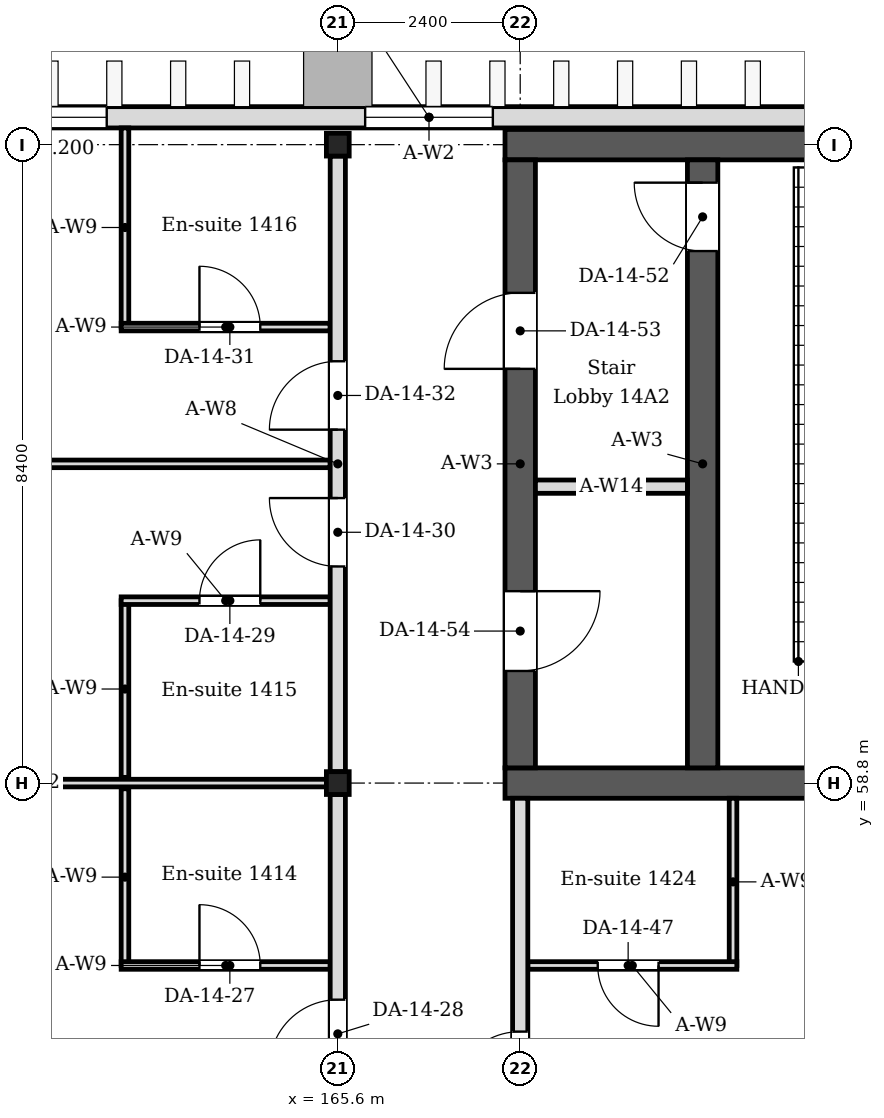
"""IFC4 building model, lengths in metres.
Left out: names, types, materials, properties, quantities, classifications, styles, units other than length and angle.
Written with IfcOpenShell. Run it as: python <this file> out.ifc"""

import sys

from ifc_helpers import new_model, si_unit, direction, frame, frame_2d, origin, origin_2d, place, context, subcontext, project, spatial, rectangle, i_section, extrude, element, fill, save


model = new_model("IFC4")
c1 = context("Model", 3, precision=1e-05, world=origin(), true_north=direction((0.0, 1.0)))
c2 = subcontext(c1, "Body", "Model", "MODEL_VIEW")
j1 = project(units=[si_unit("LENGTHUNIT", "METRE"), si_unit("PLANEANGLEUNIT", "RADIAN")], contexts=[c1])
p1 = place(None, origin())
s1 = spatial("IfcSite", under=j1, at=p1, CompositionType="ELEMENT")
p2 = place(p1, origin())
s2 = spatial("IfcBuilding", under=s1, at=p2, CompositionType="ELEMENT")
p3 = place(p2, frame((0.0, 0.0, 60.6)))
s3 = spatial("IfcBuildingStorey", under=s2, at=p3, CompositionType="ELEMENT", Elevation=60.6)
for number, where, z_axis, x_axis in (
    (1, (165.6, 58.8, 0.0), (0.0, 0.0, 1.0), (1.0, 0.0, 0.0)),
    (2, (165.6, 67.2, 0.0), (0.0, 0.0, 1.0), (1.0, 0.0, 0.0)),
):
    element("IfcColumn", number, at=place(p3, frame(where, z_axis=z_axis, x_axis=x_axis)), inside=s3, PredefinedType="COLUMN", context=c2, shape_type="SweptSolid", body=[
        extrude(i_section(OverallWidth=0.3, OverallDepth=0.3, WebThickness=0.01, FlangeThickness=0.015, FilletRadius=0.013, at=origin_2d()), origin(), (0.0, 0.0, 1.0), 4.2),
    ])
for number, where, z_axis, x_axis in (
    (3, (167.8, 58.8, 0.0), (0.0, 0.0, 1.0), (1.0, 0.0, 0.0)),
    (4, (167.8, 67.2, 0.0), (0.0, 0.0, 1.0), (1.0, 0.0, 0.0)),
):
    element("IfcWall", number, at=place(p3, frame(where, z_axis=z_axis, x_axis=x_axis)), inside=s3, PredefinedType="SOLIDWALL", context=c2, shape_type="SweptSolid", body=[
        extrude(rectangle(XDim=8.8, YDim=0.4, at=frame_2d((4.4, 0.0))), origin(), (0.0, 0.0, 1.0), 4.05),
    ])
p4 = place(p3, frame((168.0, 59.0, 0.0), z_axis=(0.0, 0.0, 1.0), x_axis=(0.0, 1.0, 0.0)))
e5 = element("IfcWall", 5, at=p4, inside=s3, PredefinedType="SOLIDWALL", context=c2, shape_type="SweptSolid", body=[
    extrude(rectangle(XDim=8.0, YDim=0.4, at=frame_2d((4.0, 0.0))), origin(), (0.0, 0.0, 1.0), 4.05),
])
p5 = place(p4, frame((5.25, 0.0, 0.0)))
e6 = element("IfcOpeningElement", 6, at=p5, cuts=e5, PredefinedType="OPENING", context=c2, shape_type="SweptSolid", body=[
    extrude(rectangle(XDim=1.0, YDim=2.1, at=frame_2d((0.5, 1.05))), frame((0.0, 0.21, 0.0), z_axis=(0.0, -1.0, 0.0), x_axis=(1.0, 0.0, 0.0)), (0.0, 0.0, 1.0), 0.42),
])
p6 = place(p4, frame((1.275, 0.0, 0.0)))
e7 = element("IfcOpeningElement", 7, at=p6, cuts=e5, PredefinedType="OPENING", context=c2, shape_type="SweptSolid", body=[
    extrude(rectangle(XDim=1.05, YDim=2.1, at=frame_2d((0.525, 1.05))), frame((0.0, 0.21, 0.0), z_axis=(0.0, -1.0, 0.0), x_axis=(1.0, 0.0, 0.0)), (0.0, 0.0, 1.0), 0.42),
])
p7 = place(p3, frame((156.7, 67.56, 0.0), z_axis=(0.0, 0.0, 1.0), x_axis=(1.0, 0.0, 0.0)))
e8 = element("IfcWall", 8, at=p7, inside=s3, PredefinedType="SOLIDWALL", context=c2, shape_type="SweptSolid", body=[
    extrude(rectangle(XDim=20.2, YDim=0.28, at=frame_2d((10.1, 0.0))), origin(), (0.0, 0.0, 1.0), 4.05),
])
p8 = place(p7, frame((9.26, 0.0, 0.6)))
e9 = element("IfcOpeningElement", 9, at=p8, cuts=e8, PredefinedType="OPENING", context=c2, shape_type="SweptSolid", body=[
    extrude(rectangle(XDim=1.68, YDim=2.4, at=frame_2d((0.84, 1.2))), frame((0.0, 0.15, 0.0), z_axis=(0.0, -1.0, 0.0), x_axis=(1.0, 0.0, 0.0)), (0.0, 0.0, 1.0), 0.3),
])
p9 = place(p7, frame((3.34, 0.0, 0.6)))
e10 = element("IfcOpeningElement", 10, at=p9, cuts=e8, PredefinedType="OPENING", context=c2, shape_type="SweptSolid", body=[
    extrude(rectangle(XDim=2.52, YDim=2.4, at=frame_2d((1.26, 1.2))), frame((0.0, 0.15, 0.0), z_axis=(0.0, -1.0, 0.0), x_axis=(1.0, 0.0, 0.0)), (0.0, 0.0, 1.0), 0.3),
])
p10 = place(p3, frame((162.8, 56.4, 0.0), z_axis=(0.0, 0.0, 1.0), x_axis=(0.0, 1.0, 0.0)))
e11 = element("IfcWall", 11, at=p10, inside=s3, PredefinedType="PARTITIONING", context=c2, shape_type="SweptSolid", body=[
    extrude(rectangle(XDim=2.325, YDim=0.1, at=frame_2d((1.163, 0.0))), origin(), (0.0, 0.0, 1.0), 4.05),
])
p11 = place(p3, frame((162.75, 56.4, 0.0), z_axis=(0.0, 0.0, 1.0), x_axis=(1.0, 0.0, 0.0)))
e12 = element("IfcWall", 12, at=p11, inside=s3, PredefinedType="PARTITIONING", context=c2, shape_type="SweptSolid", body=[
    extrude(rectangle(XDim=2.75, YDim=0.1, at=frame_2d((1.375, 0.0))), origin(), (0.0, 0.0, 1.0), 4.05),
])
p12 = place(p11, frame((1.03, 0.0, 0.0)))
e13 = element("IfcOpeningElement", 13, at=p12, cuts=e12, PredefinedType="OPENING", context=c2, shape_type="SweptSolid", body=[
    extrude(rectangle(XDim=0.8, YDim=2.1, at=frame_2d((0.4, 1.05))), frame((0.0, 0.06, 0.0), z_axis=(0.0, -1.0, 0.0), x_axis=(1.0, 0.0, 0.0)), (0.0, 0.0, 1.0), 0.12),
])
p13 = place(p3, frame((162.8, 58.875, 0.0), z_axis=(0.0, 0.0, 1.0), x_axis=(0.0, 1.0, 0.0)))
e14 = element("IfcWall", 14, at=p13, inside=s3, PredefinedType="PARTITIONING", context=c2, shape_type="SweptSolid", body=[
    extrude(rectangle(XDim=2.325, YDim=0.1, at=frame_2d((1.163, 0.0))), origin(), (0.0, 0.0, 1.0), 4.05),
])
p14 = place(p3, frame((162.75, 61.2, 0.0), z_axis=(0.0, 0.0, 1.0), x_axis=(1.0, 0.0, 0.0)))
e15 = element("IfcWall", 15, at=p14, inside=s3, PredefinedType="PARTITIONING", context=c2, shape_type="SweptSolid", body=[
    extrude(rectangle(XDim=2.75, YDim=0.1, at=frame_2d((1.375, 0.0))), origin(), (0.0, 0.0, 1.0), 4.05),
])
p15 = place(p14, frame((1.03, 0.0, 0.0)))
e16 = element("IfcOpeningElement", 16, at=p15, cuts=e15, PredefinedType="OPENING", context=c2, shape_type="SweptSolid", body=[
    extrude(rectangle(XDim=0.8, YDim=2.1, at=frame_2d((0.4, 1.05))), frame((0.0, 0.06, 0.0), z_axis=(0.0, -1.0, 0.0), x_axis=(1.0, 0.0, 0.0)), (0.0, 0.0, 1.0), 0.12),
])
p16 = place(p3, frame((162.8, 64.8, 0.0), z_axis=(0.0, 0.0, 1.0), x_axis=(0.0, 1.0, 0.0)))
e17 = element("IfcWall", 17, at=p16, inside=s3, PredefinedType="PARTITIONING", context=c2, shape_type="SweptSolid", body=[
    extrude(rectangle(XDim=2.62, YDim=0.1, at=frame_2d((1.31, 0.0))), origin(), (0.0, 0.0, 1.0), 4.05),
])
p17 = place(p3, frame((162.75, 64.8, 0.0), z_axis=(0.0, 0.0, 1.0), x_axis=(1.0, 0.0, 0.0)))
e18 = element("IfcWall", 18, at=p17, inside=s3, PredefinedType="PARTITIONING", context=c2, shape_type="SweptSolid", body=[
    extrude(rectangle(XDim=2.75, YDim=0.1, at=frame_2d((1.375, 0.0))), origin(), (0.0, 0.0, 1.0), 4.05),
])
p18 = place(p17, frame((1.03, 0.0, 0.0)))
e19 = element("IfcOpeningElement", 19, at=p18, cuts=e18, PredefinedType="OPENING", context=c2, shape_type="SweptSolid", body=[
    extrude(rectangle(XDim=0.8, YDim=2.1, at=frame_2d((0.4, 1.05))), frame((0.0, 0.06, 0.0), z_axis=(0.0, -1.0, 0.0), x_axis=(1.0, 0.0, 0.0)), (0.0, 0.0, 1.0), 0.12),
])
p19 = place(p3, frame((170.8, 56.4, 0.0), z_axis=(0.0, 0.0, 1.0), x_axis=(0.0, 1.0, 0.0)))
e20 = element("IfcWall", 20, at=p19, inside=s3, PredefinedType="PARTITIONING", context=c2, shape_type="SweptSolid", body=[
    extrude(rectangle(XDim=2.2, YDim=0.1, at=frame_2d((1.1, 0.0))), origin(), (0.0, 0.0, 1.0), 4.05),
])
p20 = place(p3, frame((170.85, 56.4, 0.0), z_axis=(0.0, 0.0, 1.0), x_axis=(-1.0, 0.0, 0.0)))
e21 = element("IfcWall", 21, at=p20, inside=s3, PredefinedType="PARTITIONING", context=c2, shape_type="SweptSolid", body=[
    extrude(rectangle(XDim=2.75, YDim=0.1, at=frame_2d((1.375, 0.0))), origin(), (0.0, 0.0, 1.0), 4.05),
])
p21 = place(p20, frame((1.03, 0.0, 0.0)))
e22 = element("IfcOpeningElement", 22, at=p21, cuts=e21, PredefinedType="OPENING", context=c2, shape_type="SweptSolid", body=[
    extrude(rectangle(XDim=0.8, YDim=2.1, at=frame_2d((0.4, 1.05))), frame((0.0, 0.06, 0.0), z_axis=(0.0, -1.0, 0.0), x_axis=(1.0, 0.0, 0.0)), (0.0, 0.0, 1.0), 0.12),
])
p22 = place(p3, frame((157.35, 58.8, 0.0), z_axis=(0.0, 0.0, 1.0), x_axis=(1.0, 0.0, 0.0)))
e23 = element("IfcWall", 23, at=p22, inside=s3, PredefinedType="PARTITIONING", context=c2, shape_type="SweptSolid", body=[
    extrude(rectangle(XDim=8.1, YDim=0.1, at=frame_2d((4.05, 0.0))), origin(), (0.0, 0.0, 1.0), 3.55),
])
p23 = place(p3, frame((156.98, 63.0, 0.0), z_axis=(0.0, 0.0, 1.0), x_axis=(1.0, 0.0, 0.0)))
e24 = element("IfcWall", 24, at=p23, inside=s3, PredefinedType="PARTITIONING", context=c2, shape_type="SweptSolid", body=[
    extrude(rectangle(XDim=8.52, YDim=0.1, at=frame_2d((4.26, 0.0))), origin(), (0.0, 0.0, 1.0), 3.55),
])
p24 = place(p3, frame((165.6, 50.55, 0.0), z_axis=(0.0, 0.0, 1.0), x_axis=(0.0, 1.0, 0.0)))
e25 = element("IfcWall", 25, at=p24, inside=s3, PredefinedType="PARTITIONING", context=c2, shape_type="SweptSolid", body=[
    extrude(rectangle(XDim=8.1, YDim=0.2, at=frame_2d((4.05, 0.0))), origin(), (0.0, 0.0, 1.0), 3.45),
])
p25 = place(p24, frame((2.7, 0.0, 0.0)))
e26 = element("IfcOpeningElement", 26, at=p25, cuts=e25, PredefinedType="OPENING", context=c2, shape_type="SweptSolid", body=[
    extrude(rectangle(XDim=0.9, YDim=2.1, at=frame_2d((0.45, 1.05))), frame((0.0, 0.11, 0.0), z_axis=(0.0, -1.0, 0.0), x_axis=(1.0, 0.0, 0.0)), (0.0, 0.0, 1.0), 0.22),
])
p26 = place(p24, frame((4.5, 0.0, 0.0)))
e27 = element("IfcOpeningElement", 27, at=p26, cuts=e25, PredefinedType="OPENING", context=c2, shape_type="SweptSolid", body=[
    extrude(rectangle(XDim=0.9, YDim=2.1, at=frame_2d((0.45, 1.05))), frame((0.0, 0.11, 0.0), z_axis=(0.0, -1.0, 0.0), x_axis=(1.0, 0.0, 0.0)), (0.0, 0.0, 1.0), 0.22),
])
p27 = place(p3, frame((165.6, 58.95, 0.0), z_axis=(0.0, 0.0, 1.0), x_axis=(0.0, 1.0, 0.0)))
e28 = element("IfcWall", 28, at=p27, inside=s3, PredefinedType="PARTITIONING", context=c2, shape_type="SweptSolid", body=[
    extrude(rectangle(XDim=8.1, YDim=0.2, at=frame_2d((4.05, 0.0))), origin(), (0.0, 0.0, 1.0), 3.45),
])
p28 = place(p27, frame((2.7, 0.0, 0.0)))
e29 = element("IfcOpeningElement", 29, at=p28, cuts=e28, PredefinedType="OPENING", context=c2, shape_type="SweptSolid", body=[
    extrude(rectangle(XDim=0.9, YDim=2.1, at=frame_2d((0.45, 1.05))), frame((0.0, 0.11, 0.0), z_axis=(0.0, -1.0, 0.0), x_axis=(1.0, 0.0, 0.0)), (0.0, 0.0, 1.0), 0.22),
])
p29 = place(p27, frame((4.5, 0.0, 0.0)))
e30 = element("IfcOpeningElement", 30, at=p29, cuts=e28, PredefinedType="OPENING", context=c2, shape_type="SweptSolid", body=[
    extrude(rectangle(XDim=0.9, YDim=2.1, at=frame_2d((0.45, 1.05))), frame((0.0, 0.11, 0.0), z_axis=(0.0, -1.0, 0.0), x_axis=(1.0, 0.0, 0.0)), (0.0, 0.0, 1.0), 0.22),
])
p30 = place(p3, frame((168.0, 50.55, 0.0), z_axis=(0.0, 0.0, 1.0), x_axis=(0.0, 1.0, 0.0)))
e31 = element("IfcWall", 31, at=p30, inside=s3, PredefinedType="PARTITIONING", context=c2, shape_type="SweptSolid", body=[
    extrude(rectangle(XDim=8.05, YDim=0.2, at=frame_2d((4.025, 0.0))), origin(), (0.0, 0.0, 1.0), 3.45),
])
p31 = place(p30, frame((2.08, 0.0, 0.0)))
e32 = element("IfcOpeningElement", 32, at=p31, cuts=e31, PredefinedType="OPENING", context=c2, shape_type="SweptSolid", body=[
    extrude(rectangle(XDim=0.9, YDim=2.1, at=frame_2d((0.45, 1.05))), frame((0.0, 0.11, 0.0), z_axis=(0.0, -1.0, 0.0), x_axis=(1.0, 0.0, 0.0)), (0.0, 0.0, 1.0), 0.22),
])
p32 = place(p30, frame((4.08, 0.0, 0.0)))
e33 = element("IfcOpeningElement", 33, at=p32, cuts=e31, PredefinedType="OPENING", context=c2, shape_type="SweptSolid", body=[
    extrude(rectangle(XDim=0.9, YDim=2.1, at=frame_2d((0.45, 1.05))), frame((0.0, 0.11, 0.0), z_axis=(0.0, -1.0, 0.0), x_axis=(1.0, 0.0, 0.0)), (0.0, 0.0, 1.0), 0.22),
])
p33 = place(p3, frame((170.4, 59.0, 0.0), z_axis=(0.0, 0.0, 1.0), x_axis=(0.0, 1.0, 0.0)))
e34 = element("IfcWall", 34, at=p33, inside=s3, PredefinedType="SOLIDWALL", context=c2, shape_type="SweptSolid", body=[
    extrude(rectangle(XDim=8.0, YDim=0.4, at=frame_2d((4.0, 0.0))), origin(), (0.0, 0.0, 1.0), 4.05),
])
p34 = place(p33, frame((6.8, 0.0, 0.0)))
e35 = element("IfcOpeningElement", 35, at=p34, cuts=e34, PredefinedType="OPENING", context=c2, shape_type="SweptSolid", body=[
    extrude(rectangle(XDim=0.9, YDim=2.1, at=frame_2d((0.45, 1.05))), frame((0.0, 0.21, 0.0), z_axis=(0.0, -1.0, 0.0), x_axis=(1.0, 0.0, 0.0)), (0.0, 0.0, 1.0), 0.42),
])
p35 = place(p3, frame((168.2, 62.7, 0.0), z_axis=(0.0, 0.0, 1.0), x_axis=(1.0, 0.0, 0.0)))
e36 = element("IfcWall", 36, at=p35, inside=s3, PredefinedType="PARTITIONING", context=c2, shape_type="SweptSolid", body=[
    extrude(rectangle(XDim=2.0, YDim=0.175, at=frame_2d((1.0, 0.0))), origin(), (0.0, 0.0, 1.0), 4.05),
])
p36 = place(p8, origin())
e37 = element("IfcWindow", 37, at=p36, inside=s3, PartitioningType="SINGLE_PANEL", PredefinedType="WINDOW", context=c2, shape_type="SweptSolid", body=[
    extrude(rectangle(XDim=1.68, YDim=2.4, at=frame_2d((0.84, 1.2))), frame((0.0, 0.03, 0.0), z_axis=(0.0, -1.0, 0.0), x_axis=(1.0, 0.0, 0.0)), (0.0, 0.0, 1.0), 0.06),
])
fill(e9, e37)
p37 = place(p9, origin())
e38 = element("IfcWindow", 38, at=p37, inside=s3, PartitioningType="SINGLE_PANEL", PredefinedType="WINDOW", context=c2, shape_type="SweptSolid", body=[
    extrude(rectangle(XDim=2.52, YDim=2.4, at=frame_2d((1.26, 1.2))), frame((0.0, 0.03, 0.0), z_axis=(0.0, -1.0, 0.0), x_axis=(1.0, 0.0, 0.0)), (0.0, 0.0, 1.0), 0.06),
])
fill(e10, e38)
p38 = place(p12, origin())
e39 = element("IfcDoor", 39, at=p38, inside=s3, OperationType="SINGLE_SWING_LEFT", PredefinedType="DOOR", context=c2, shape_type="SweptSolid", body=[
    extrude(rectangle(XDim=0.8, YDim=2.1, at=frame_2d((0.4, 1.05))), frame((0.0, 0.025, 0.0), z_axis=(0.0, -1.0, 0.0), x_axis=(1.0, 0.0, 0.0)), (0.0, 0.0, 1.0), 0.05),
])
fill(e13, e39)
p39 = place(p26, origin())
e40 = element("IfcDoor", 40, at=p39, inside=s3, OperationType="SINGLE_SWING_LEFT", PredefinedType="DOOR", context=c2, shape_type="SweptSolid", body=[
    extrude(rectangle(XDim=0.9, YDim=2.1, at=frame_2d((0.45, 1.05))), frame((0.0, 0.025, 0.0), z_axis=(0.0, -1.0, 0.0), x_axis=(1.0, 0.0, 0.0)), (0.0, 0.0, 1.0), 0.05),
])
fill(e27, e40)
p40 = place(p15, origin())
e41 = element("IfcDoor", 41, at=p40, inside=s3, OperationType="SINGLE_SWING_RIGHT", PredefinedType="DOOR", context=c2, shape_type="SweptSolid", body=[
    extrude(rectangle(XDim=0.8, YDim=2.1, at=frame_2d((0.4, 1.05))), frame((0.0, 0.025, 0.0), z_axis=(0.0, -1.0, 0.0), x_axis=(1.0, 0.0, 0.0)), (0.0, 0.0, 1.0), 0.05),
])
fill(e16, e41)
p41 = place(p28, origin())
e42 = element("IfcDoor", 42, at=p41, inside=s3, OperationType="SINGLE_SWING_RIGHT", PredefinedType="DOOR", context=c2, shape_type="SweptSolid", body=[
    extrude(rectangle(XDim=0.9, YDim=2.1, at=frame_2d((0.45, 1.05))), frame((0.0, 0.025, 0.0), z_axis=(0.0, -1.0, 0.0), x_axis=(1.0, 0.0, 0.0)), (0.0, 0.0, 1.0), 0.05),
])
fill(e29, e42)
p42 = place(p18, origin())
e43 = element("IfcDoor", 43, at=p42, inside=s3, OperationType="SINGLE_SWING_LEFT", PredefinedType="DOOR", context=c2, shape_type="SweptSolid", body=[
    extrude(rectangle(XDim=0.8, YDim=2.1, at=frame_2d((0.4, 1.05))), frame((0.0, 0.025, 0.0), z_axis=(0.0, -1.0, 0.0), x_axis=(1.0, 0.0, 0.0)), (0.0, 0.0, 1.0), 0.05),
])
fill(e19, e43)
p43 = place(p29, origin())
e44 = element("IfcDoor", 44, at=p43, inside=s3, OperationType="SINGLE_SWING_LEFT", PredefinedType="DOOR", context=c2, shape_type="SweptSolid", body=[
    extrude(rectangle(XDim=0.9, YDim=2.1, at=frame_2d((0.45, 1.05))), frame((0.0, 0.025, 0.0), z_axis=(0.0, -1.0, 0.0), x_axis=(1.0, 0.0, 0.0)), (0.0, 0.0, 1.0), 0.05),
])
fill(e30, e44)
p44 = place(p21, origin())
e45 = element("IfcDoor", 45, at=p44, inside=s3, OperationType="SINGLE_SWING_LEFT", PredefinedType="DOOR", context=c2, shape_type="SweptSolid", body=[
    extrude(rectangle(XDim=0.8, YDim=2.1, at=frame_2d((0.4, 1.05))), frame((0.0, 0.025, 0.0), z_axis=(0.0, -1.0, 0.0), x_axis=(1.0, 0.0, 0.0)), (0.0, 0.0, 1.0), 0.05),
])
fill(e22, e45)
p45 = place(p32, origin())
e46 = element("IfcDoor", 46, at=p45, inside=s3, OperationType="SINGLE_SWING_LEFT", PredefinedType="DOOR", context=c2, shape_type="SweptSolid", body=[
    extrude(rectangle(XDim=0.9, YDim=2.1, at=frame_2d((0.45, 1.05))), frame((0.0, 0.025, 0.0), z_axis=(0.0, -1.0, 0.0), x_axis=(1.0, 0.0, 0.0)), (0.0, 0.0, 1.0), 0.05),
])
fill(e33, e46)
p46 = place(p34, origin())
e47 = element("IfcDoor", 47, at=p46, inside=s3, OperationType="SINGLE_SWING_RIGHT", PredefinedType="DOOR", context=c2, shape_type="SweptSolid", body=[
    extrude(rectangle(XDim=0.9, YDim=2.1, at=frame_2d((0.45, 1.05))), frame((0.0, 0.025, 0.0), z_axis=(0.0, -1.0, 0.0), x_axis=(1.0, 0.0, 0.0)), (0.0, 0.0, 1.0), 0.05),
])
fill(e35, e47)
p47 = place(p5, origin())
e48 = element("IfcDoor", 48, at=p47, inside=s3, OperationType="SINGLE_SWING_LEFT", PredefinedType="DOOR", context=c2, shape_type="SweptSolid", body=[
    extrude(rectangle(XDim=1.0, YDim=2.1, at=frame_2d((0.5, 1.05))), frame((0.0, 0.025, 0.0), z_axis=(0.0, -1.0, 0.0), x_axis=(1.0, 0.0, 0.0)), (0.0, 0.0, 1.0), 0.05),
])
fill(e6, e48)
p48 = place(p6, origin())
e49 = element("IfcDoor", 49, at=p48, inside=s3, OperationType="SINGLE_SWING_RIGHT", PredefinedType="DOOR", context=c2, shape_type="SweptSolid", body=[
    extrude(rectangle(XDim=1.05, YDim=2.1, at=frame_2d((0.525, 1.05))), frame((0.0, 0.025, 0.0), z_axis=(0.0, -1.0, 0.0), x_axis=(1.0, 0.0, 0.0)), (0.0, 0.0, 1.0), 0.05),
])
fill(e7, e49)
save(model, sys.argv[1])
